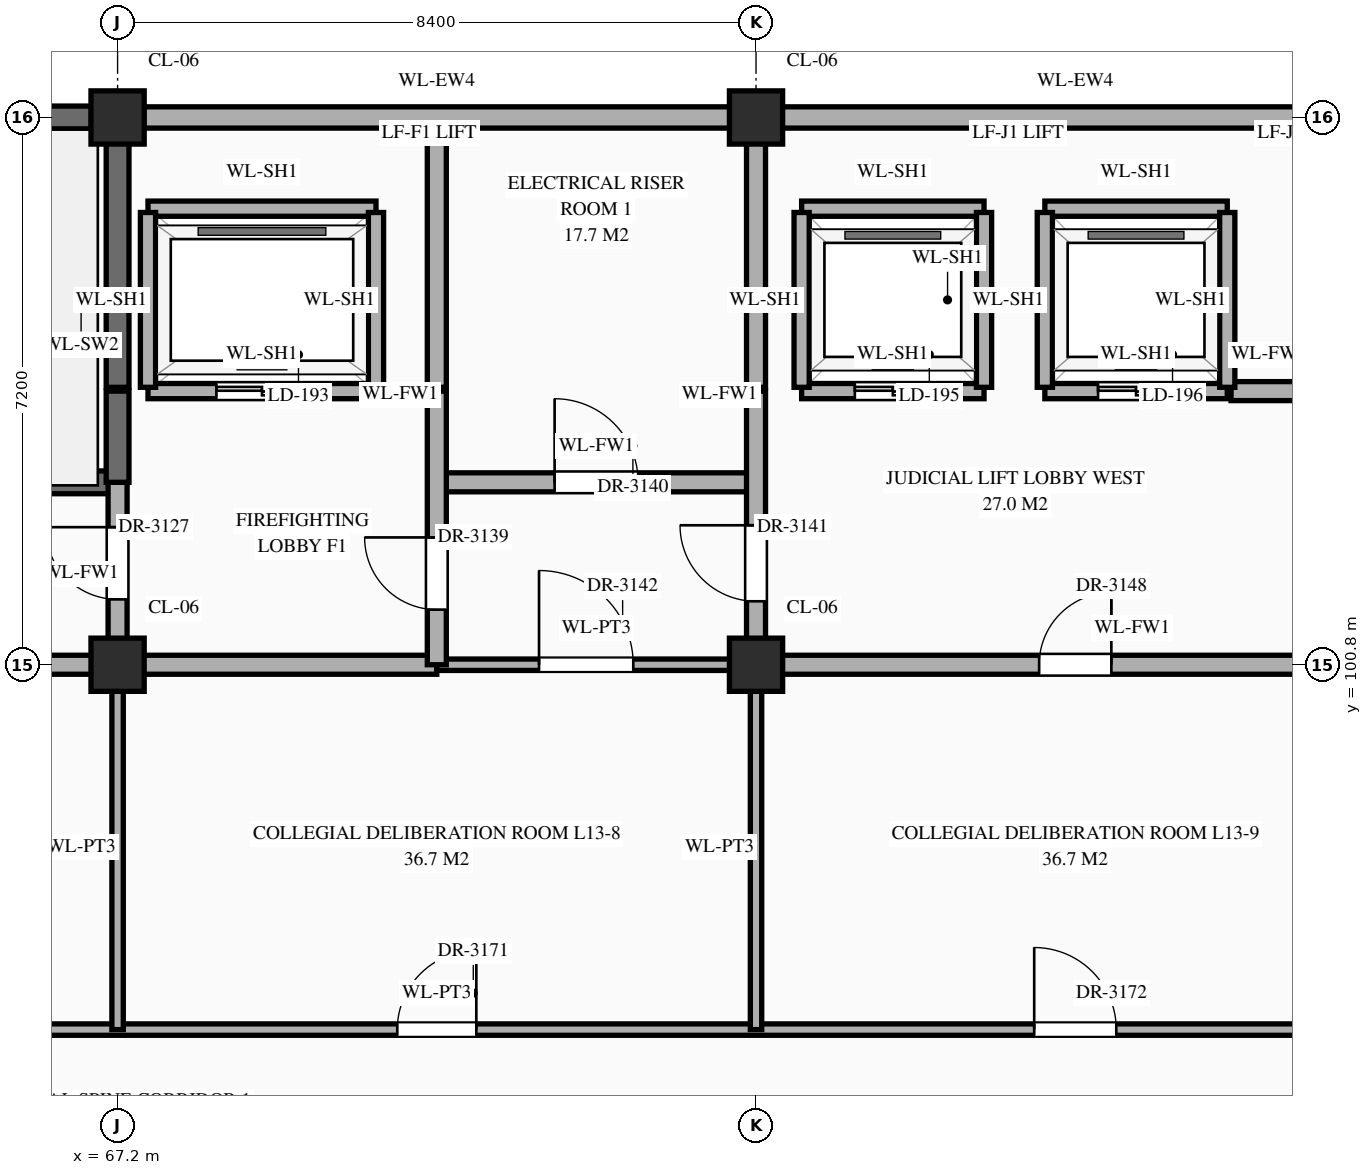
"""IFC4 building model, lengths in metres.
Left out: names, types, materials, properties, quantities, classifications, styles, units other than length and angle.
Written with IfcOpenShell. Run it as: python <this file> out.ifc"""

import sys

from ifc_helpers import new_model, si_unit, direction, frame, frame_2d, origin, origin_2d, place, context, subcontext, project, spatial, rectangle, extrude, element, fill, save


model = new_model("IFC4")
c1 = context("Model", 3, precision=1e-05, world=origin(), true_north=direction((0.0, 1.0)))
c2 = subcontext(c1, "Body", "Model", "MODEL_VIEW")
j1 = project(units=[si_unit("LENGTHUNIT", "METRE"), si_unit("PLANEANGLEUNIT", "RADIAN")], contexts=[c1])
p1 = place(None, origin())
s1 = spatial("IfcSite", under=j1, at=p1, CompositionType="ELEMENT")
p2 = place(p1, origin())
s2 = spatial("IfcBuilding", under=s1, at=p2, CompositionType="ELEMENT")
p3 = place(p2, frame((0.0, 0.0, 56.1)))
s3 = spatial("IfcBuildingStorey", under=s2, at=p3, CompositionType="ELEMENT", Elevation=56.1)
for number, where, z_axis, x_axis in (
    (1, (67.2, 100.8, 0.0), (0.0, 0.0, 1.0), (1.0, 0.0, 0.0)),
    (2, (67.2, 108.0, 0.0), (0.0, 0.0, 1.0), (1.0, 0.0, 0.0)),
    (3, (75.6, 100.8, 0.0), (0.0, 0.0, 1.0), (1.0, 0.0, 0.0)),
    (4, (75.6, 108.0, 0.0), (0.0, 0.0, 1.0), (1.0, 0.0, 0.0)),
):
    element("IfcColumn", number, at=place(p3, frame(where, z_axis=z_axis, x_axis=x_axis)), inside=s3, PredefinedType="COLUMN", context=c2, shape_type="SweptSolid", body=[
        extrude(rectangle(XDim=0.7, YDim=0.7, at=origin_2d()), origin(), (0.0, 0.0, 1.0), 4.2),
    ])
p4 = place(p3, frame((59.145, 108.0, 0.0), z_axis=(0.0, 0.0, 1.0), x_axis=(1.0, 0.0, 0.0)))
e5 = element("IfcWall", 5, at=p4, inside=s3, PredefinedType="SHEAR", context=c2, shape_type="SweptSolid", body=[
    extrude(rectangle(XDim=7.71, YDim=0.3, at=frame_2d((3.855, 0.0))), origin(), (0.0, 0.0, 1.0), 3.96),
])
for number, where, z_axis, x_axis in (
    (6, (67.545, 108.0, 0.0), (0.0, 0.0, 1.0), (1.0, 0.0, 0.0)),
    (7, (75.945, 108.0, 0.0), (0.0, 0.0, 1.0), (1.0, 0.0, 0.0)),
):
    element("IfcWall", number, at=place(p3, frame(where, z_axis=z_axis, x_axis=x_axis)), inside=s3, PredefinedType="STANDARD", context=c2, shape_type="SweptSolid", body=[
        extrude(rectangle(XDim=7.71, YDim=0.28, at=frame_2d((3.855, 0.0))), origin(), (0.0, 0.0, 1.0), 3.31),
    ])
p5 = place(p3, frame((58.8, 96.0, 0.0), z_axis=(0.0, 0.0, 1.0), x_axis=(1.0, 0.0, 0.0)))
e8 = element("IfcWall", 8, at=p5, inside=s3, PredefinedType="STANDARD", context=c2, shape_type="SweptSolid", body=[
    extrude(rectangle(XDim=25.2, YDim=0.15, at=frame_2d((12.6, 0.0))), origin(), (0.0, 0.0, 1.0), 3.96),
])
p6 = place(p5, frame((3.7, 0.0, 0.0)))
e9 = element("IfcOpeningElement", 9, at=p6, cuts=e8, PredefinedType="OPENING", context=c2, shape_type="SweptSolid", body=[
    extrude(rectangle(XDim=1.0, YDim=2.25, at=frame_2d((0.5, 1.125))), frame((0.0, 0.087, 0.0), z_axis=(0.0, -1.0, 0.0), x_axis=(1.0, 0.0, 0.0)), (0.0, 0.0, 1.0), 0.174),
])
p7 = place(p5, frame((12.08, 0.0, 0.0)))
e10 = element("IfcOpeningElement", 10, at=p7, cuts=e8, PredefinedType="OPENING", context=c2, shape_type="SweptSolid", body=[
    extrude(rectangle(XDim=1.04, YDim=2.2, at=frame_2d((0.52, 1.1))), frame((0.0, 0.087, 0.0), z_axis=(0.0, -1.0, 0.0), x_axis=(1.0, 0.0, 0.0)), (0.0, 0.0, 1.0), 0.174),
])
p8 = place(p5, frame((20.46, 0.0, 0.0)))
e11 = element("IfcOpeningElement", 11, at=p8, cuts=e8, PredefinedType="OPENING", context=c2, shape_type="SweptSolid", body=[
    extrude(rectangle(XDim=1.08, YDim=2.25, at=frame_2d((0.54, 1.125))), frame((0.0, 0.087, 0.0), z_axis=(0.0, -1.0, 0.0), x_axis=(1.0, 0.0, 0.0)), (0.0, 0.0, 1.0), 0.174),
])
p9 = place(p3, frame((58.8, 100.8, 0.0), z_axis=(0.0, 0.0, 1.0), x_axis=(1.0, 0.0, 0.0)))
e12 = element("IfcWall", 12, at=p9, inside=s3, PredefinedType="STANDARD", context=c2, shape_type="SweptSolid", body=[
    extrude(rectangle(XDim=12.6, YDim=0.25, at=frame_2d((6.3, 0.0))), origin(), (0.0, 0.0, 1.0), 3.11),
])
p10 = place(p9, frame((3.7, 0.0, 0.0)))
e13 = element("IfcOpeningElement", 13, at=p10, cuts=e12, PredefinedType="OPENING", context=c2, shape_type="SweptSolid", body=[
    extrude(rectangle(XDim=1.0, YDim=2.2, at=frame_2d((0.5, 1.1))), frame((0.0, 0.137, 0.0), z_axis=(0.0, -1.0, 0.0), x_axis=(1.0, 0.0, 0.0)), (0.0, 0.0, 1.0), 0.274),
])
p11 = place(p3, frame((71.4, 100.8, 0.0), z_axis=(0.0, 0.0, 1.0), x_axis=(1.0, 0.0, 0.0)))
e14 = element("IfcWall", 14, at=p11, inside=s3, PredefinedType="STANDARD", context=c2, shape_type="SweptSolid", body=[
    extrude(rectangle(XDim=4.2, YDim=0.15, at=frame_2d((2.1, 0.0))), origin(), (0.0, 0.0, 1.0), 3.11),
])
p12 = place(p11, frame((1.345, 0.0, 0.0)))
e15 = element("IfcOpeningElement", 15, at=p12, cuts=e14, PredefinedType="OPENING", context=c2, shape_type="SweptSolid", body=[
    extrude(rectangle(XDim=1.24, YDim=2.3, at=frame_2d((0.62, 1.15))), frame((0.0, 0.087, 0.0), z_axis=(0.0, -1.0, 0.0), x_axis=(1.0, 0.0, 0.0)), (0.0, 0.0, 1.0), 0.174),
])
p13 = place(p3, frame((75.6, 100.8, 0.0), z_axis=(0.0, 0.0, 1.0), x_axis=(1.0, 0.0, 0.0)))
e16 = element("IfcWall", 16, at=p13, inside=s3, PredefinedType="STANDARD", context=c2, shape_type="SweptSolid", body=[
    extrude(rectangle(XDim=16.8, YDim=0.25, at=frame_2d((8.4, 0.0))), origin(), (0.0, 0.0, 1.0), 3.11),
])
p14 = place(p13, frame((3.725, 0.0, 0.0)))
e17 = element("IfcOpeningElement", 17, at=p14, cuts=e16, PredefinedType="OPENING", context=c2, shape_type="SweptSolid", body=[
    extrude(rectangle(XDim=0.95, YDim=2.15, at=frame_2d((0.475, 1.075))), frame((0.0, 0.137, 0.0), z_axis=(0.0, -1.0, 0.0), x_axis=(1.0, 0.0, 0.0)), (0.0, 0.0, 1.0), 0.274),
])
p15 = place(p13, frame((9.685, 0.0, 0.0)))
e18 = element("IfcOpeningElement", 18, at=p15, cuts=e16, PredefinedType="OPENING", context=c2, shape_type="SweptSolid", body=[
    extrude(rectangle(XDim=1.1, YDim=2.2, at=frame_2d((0.55, 1.1))), frame((0.0, 0.137, 0.0), z_axis=(0.0, -1.0, 0.0), x_axis=(1.0, 0.0, 0.0)), (0.0, 0.0, 1.0), 0.274),
])
p16 = place(p13, frame((12.5, 0.0, 0.0)))
e19 = element("IfcOpeningElement", 19, at=p16, cuts=e16, PredefinedType="OPENING", context=c2, shape_type="SweptSolid", body=[
    extrude(rectangle(XDim=1.0, YDim=2.2, at=frame_2d((0.5, 1.1))), frame((0.0, 0.137, 0.0), z_axis=(0.0, -1.0, 0.0), x_axis=(1.0, 0.0, 0.0)), (0.0, 0.0, 1.0), 0.274),
])
p17 = place(p13, frame((14.89, 0.0, 0.0)))
e20 = element("IfcOpeningElement", 20, at=p17, cuts=e16, PredefinedType="OPENING", context=c2, shape_type="SweptSolid", body=[
    extrude(rectangle(XDim=0.95, YDim=2.15, at=frame_2d((0.475, 1.075))), frame((0.0, 0.137, 0.0), z_axis=(0.0, -1.0, 0.0), x_axis=(1.0, 0.0, 0.0)), (0.0, 0.0, 1.0), 0.274),
])
p18 = place(p3, frame((58.8, 103.2, 0.0), z_axis=(0.0, 0.0, 1.0), x_axis=(1.0, 0.0, 0.0)))
e21 = element("IfcWall", 21, at=p18, inside=s3, PredefinedType="SHEAR", context=c2, shape_type="SweptSolid", body=[
    extrude(rectangle(XDim=8.4, YDim=0.3, at=frame_2d((4.2, 0.0))), origin(), (0.0, 0.0, 1.0), 3.96),
])
p19 = place(p18, frame((0.65, 0.0, 0.0)))
e22 = element("IfcOpeningElement", 22, at=p19, cuts=e21, PredefinedType="OPENING", context=c2, shape_type="SweptSolid", body=[
    extrude(rectangle(XDim=1.1, YDim=2.2, at=frame_2d((0.55, 1.1))), frame((0.0, 0.162, 0.0), z_axis=(0.0, -1.0, 0.0), x_axis=(1.0, 0.0, 0.0)), (0.0, 0.0, 1.0), 0.324),
])
p20 = place(p3, frame((71.4, 103.2, 0.0), z_axis=(0.0, 0.0, 1.0), x_axis=(1.0, 0.0, 0.0)))
e23 = element("IfcWall", 23, at=p20, inside=s3, PredefinedType="STANDARD", context=c2, shape_type="SweptSolid", body=[
    extrude(rectangle(XDim=4.2, YDim=0.25, at=frame_2d((2.1, 0.0))), origin(), (0.0, 0.0, 1.0), 3.96),
])
p21 = place(p20, frame((1.55, 0.0, 0.0)))
e24 = element("IfcOpeningElement", 24, at=p21, cuts=e23, PredefinedType="OPENING", context=c2, shape_type="SweptSolid", body=[
    extrude(rectangle(XDim=1.1, YDim=2.2, at=frame_2d((0.55, 1.1))), frame((0.0, 0.137, 0.0), z_axis=(0.0, -1.0, 0.0), x_axis=(1.0, 0.0, 0.0)), (0.0, 0.0, 1.0), 0.274),
])
p22 = place(p3, frame((67.6, 104.4, 0.0), z_axis=(0.0, 0.0, 1.0), x_axis=(1.0, 0.0, 0.0)))
e25 = element("IfcWall", 25, at=p22, inside=s3, PredefinedType="STANDARD", context=c2, shape_type="SweptSolid", body=[
    extrude(rectangle(XDim=3.0, YDim=0.2, at=frame_2d((1.5, 0.0))), origin(), (0.0, 0.0, 1.0), 3.96),
])
p23 = place(p22, frame((0.9, 0.0, 0.0)))
e26 = element("IfcOpeningElement", 26, at=p23, cuts=e25, PredefinedType="OPENING", context=c2, shape_type="SweptSolid", body=[
    extrude(rectangle(XDim=1.2, YDim=2.15, at=frame_2d((0.6, 1.075))), frame((0.0, 0.112, 0.0), z_axis=(0.0, -1.0, 0.0), x_axis=(1.0, 0.0, 0.0)), (0.0, 0.0, 1.0), 0.224),
])
p24 = place(p3, frame((76.2, 104.4, 0.0), z_axis=(0.0, 0.0, 1.0), x_axis=(1.0, 0.0, 0.0)))
e27 = element("IfcWall", 27, at=p24, inside=s3, PredefinedType="STANDARD", context=c2, shape_type="SweptSolid", body=[
    extrude(rectangle(XDim=2.4, YDim=0.2, at=frame_2d((1.2, 0.0))), origin(), (0.0, 0.0, 1.0), 3.96),
])
p25 = place(p24, frame((0.7, 0.0, 0.0)))
e28 = element("IfcOpeningElement", 28, at=p25, cuts=e27, PredefinedType="OPENING", context=c2, shape_type="SweptSolid", body=[
    extrude(rectangle(XDim=1.0, YDim=2.15, at=frame_2d((0.5, 1.075))), frame((0.0, 0.112, 0.0), z_axis=(0.0, -1.0, 0.0), x_axis=(1.0, 0.0, 0.0)), (0.0, 0.0, 1.0), 0.224),
])
p26 = place(p3, frame((79.4, 104.4, 0.0), z_axis=(0.0, 0.0, 1.0), x_axis=(1.0, 0.0, 0.0)))
e29 = element("IfcWall", 29, at=p26, inside=s3, PredefinedType="STANDARD", context=c2, shape_type="SweptSolid", body=[
    extrude(rectangle(XDim=2.4, YDim=0.2, at=frame_2d((1.2, 0.0))), origin(), (0.0, 0.0, 1.0), 3.96),
])
p27 = place(p26, frame((0.7, 0.0, 0.0)))
e30 = element("IfcOpeningElement", 30, at=p27, cuts=e29, PredefinedType="OPENING", context=c2, shape_type="SweptSolid", body=[
    extrude(rectangle(XDim=1.0, YDim=2.15, at=frame_2d((0.5, 1.075))), frame((0.0, 0.112, 0.0), z_axis=(0.0, -1.0, 0.0), x_axis=(1.0, 0.0, 0.0)), (0.0, 0.0, 1.0), 0.224),
])
p28 = place(p3, frame((81.85, 104.4, 0.0), z_axis=(0.0, 0.0, 1.0), x_axis=(1.0, 0.0, 0.0)))
e31 = element("IfcWall", 31, at=p28, inside=s3, PredefinedType="STANDARD", context=c2, shape_type="SweptSolid", body=[
    extrude(rectangle(XDim=2.1, YDim=0.25, at=frame_2d((1.05, 0.0))), origin(), (0.0, 0.0, 1.0), 3.96),
])
p29 = place(p3, frame((67.6, 106.8, 0.0), z_axis=(0.0, 0.0, 1.0), x_axis=(1.0, 0.0, 0.0)))
e32 = element("IfcWall", 32, at=p29, inside=s3, PredefinedType="STANDARD", context=c2, shape_type="SweptSolid", body=[
    extrude(rectangle(XDim=3.0, YDim=0.2, at=frame_2d((1.5, 0.0))), origin(), (0.0, 0.0, 1.0), 3.96),
])
for number, where, z_axis, x_axis in (
    (33, (76.2, 106.8, 0.0), (0.0, 0.0, 1.0), (1.0, 0.0, 0.0)),
    (34, (79.4, 106.8, 0.0), (0.0, 0.0, 1.0), (1.0, 0.0, 0.0)),
):
    element("IfcWall", number, at=place(p3, frame(where, z_axis=z_axis, x_axis=x_axis)), inside=s3, PredefinedType="STANDARD", context=c2, shape_type="SweptSolid", body=[
        extrude(rectangle(XDim=2.4, YDim=0.2, at=frame_2d((1.2, 0.0))), origin(), (0.0, 0.0, 1.0), 3.96),
    ])
p30 = place(p3, frame((67.2, 96.0, 0.0), z_axis=(0.0, 0.0, 1.0), x_axis=(0.0, 1.0, 0.0)))
e35 = element("IfcWall", 35, at=p30, inside=s3, PredefinedType="STANDARD", context=c2, shape_type="SweptSolid", body=[
    extrude(rectangle(XDim=4.8, YDim=0.15, at=frame_2d((2.4, 0.0))), origin(), (0.0, 0.0, 1.0), 3.21),
])
p31 = place(p3, frame((67.2, 100.8, 0.0), z_axis=(0.0, 0.0, 1.0), x_axis=(0.0, 1.0, 0.0)))
e36 = element("IfcWall", 36, at=p31, inside=s3, PredefinedType="STANDARD", context=c2, shape_type="SweptSolid", body=[
    extrude(rectangle(XDim=2.4, YDim=0.25, at=frame_2d((1.2, 0.0))), origin(), (0.0, 0.0, 1.0), 3.21),
])
p32 = place(p31, frame((0.86, 0.0, 0.0)))
e37 = element("IfcOpeningElement", 37, at=p32, cuts=e36, PredefinedType="OPENING", context=c2, shape_type="SweptSolid", body=[
    extrude(rectangle(XDim=0.95, YDim=2.15, at=frame_2d((0.475, 1.075))), frame((0.0, 0.137, 0.0), z_axis=(0.0, -1.0, 0.0), x_axis=(1.0, 0.0, 0.0)), (0.0, 0.0, 1.0), 0.274),
])
p33 = place(p3, frame((67.2, 103.2, 0.0), z_axis=(0.0, 0.0, 1.0), x_axis=(0.0, 1.0, 0.0)))
e38 = element("IfcWall", 38, at=p33, inside=s3, PredefinedType="SHEAR", context=c2, shape_type="SweptSolid", body=[
    extrude(rectangle(XDim=1.2, YDim=0.3, at=frame_2d((0.6, 0.0))), origin(), (0.0, 0.0, 1.0), 3.96),
])
p34 = place(p3, frame((67.2, 104.45, 0.0), z_axis=(0.0, 0.0, 1.0), x_axis=(0.0, 1.0, 0.0)))
e39 = element("IfcWall", 39, at=p34, inside=s3, PredefinedType="SHEAR", context=c2, shape_type="SweptSolid", body=[
    extrude(rectangle(XDim=3.46, YDim=0.3, at=frame_2d((1.73, 0.0))), origin(), (0.0, 0.0, 1.0), 3.96),
])
for number, where, z_axis, x_axis in (
    (40, (67.6, 104.45, 0.0), (0.0, 0.0, 1.0), (0.0, 1.0, 0.0)),
    (41, (70.6, 104.45, 0.0), (0.0, 0.0, 1.0), (0.0, 1.0, 0.0)),
):
    element("IfcWall", number, at=place(p3, frame(where, z_axis=z_axis, x_axis=x_axis)), inside=s3, PredefinedType="STANDARD", context=c2, shape_type="SweptSolid", body=[
        extrude(rectangle(XDim=2.3, YDim=0.2, at=frame_2d((1.15, 0.0))), origin(), (0.0, 0.0, 1.0), 3.96),
    ])
p35 = place(p3, frame((71.4, 100.8, 0.0), z_axis=(0.0, 0.0, 1.0), x_axis=(0.0, 1.0, 0.0)))
e42 = element("IfcWall", 42, at=p35, inside=s3, PredefinedType="STANDARD", context=c2, shape_type="SweptSolid", body=[
    extrude(rectangle(XDim=3.6, YDim=0.25, at=frame_2d((1.8, 0.0))), origin(), (0.0, 0.0, 1.0), 3.61),
])
p36 = place(p35, frame((0.725, 0.0, 0.0)))
e43 = element("IfcOpeningElement", 43, at=p36, cuts=e42, PredefinedType="OPENING", context=c2, shape_type="SweptSolid", body=[
    extrude(rectangle(XDim=0.95, YDim=2.15, at=frame_2d((0.475, 1.075))), frame((0.0, 0.137, 0.0), z_axis=(0.0, -1.0, 0.0), x_axis=(1.0, 0.0, 0.0)), (0.0, 0.0, 1.0), 0.274),
])
p37 = place(p3, frame((71.4, 104.45, 0.0), z_axis=(0.0, 0.0, 1.0), x_axis=(0.0, 1.0, 0.0)))
e44 = element("IfcWall", 44, at=p37, inside=s3, PredefinedType="STANDARD", context=c2, shape_type="SweptSolid", body=[
    extrude(rectangle(XDim=3.46, YDim=0.25, at=frame_2d((1.73, 0.0))), origin(), (0.0, 0.0, 1.0), 3.61),
])
p38 = place(p3, frame((75.6, 96.0, 0.0), z_axis=(0.0, 0.0, 1.0), x_axis=(0.0, 1.0, 0.0)))
e45 = element("IfcWall", 45, at=p38, inside=s3, PredefinedType="STANDARD", context=c2, shape_type="SweptSolid", body=[
    extrude(rectangle(XDim=4.8, YDim=0.15, at=frame_2d((2.4, 0.0))), origin(), (0.0, 0.0, 1.0), 3.21),
])
p39 = place(p3, frame((75.6, 100.8, 0.0), z_axis=(0.0, 0.0, 1.0), x_axis=(0.0, 1.0, 0.0)))
e46 = element("IfcWall", 46, at=p39, inside=s3, PredefinedType="STANDARD", context=c2, shape_type="SweptSolid", body=[
    extrude(rectangle(XDim=3.6, YDim=0.25, at=frame_2d((1.8, 0.0))), origin(), (0.0, 0.0, 1.0), 3.21),
])
p40 = place(p39, frame((0.835, 0.0, 0.0)))
e47 = element("IfcOpeningElement", 47, at=p40, cuts=e46, PredefinedType="OPENING", context=c2, shape_type="SweptSolid", body=[
    extrude(rectangle(XDim=1.0, YDim=2.2, at=frame_2d((0.5, 1.1))), frame((0.0, 0.137, 0.0), z_axis=(0.0, -1.0, 0.0), x_axis=(1.0, 0.0, 0.0)), (0.0, 0.0, 1.0), 0.274),
])
p41 = place(p3, frame((75.6, 104.45, 0.0), z_axis=(0.0, 0.0, 1.0), x_axis=(0.0, 1.0, 0.0)))
e48 = element("IfcWall", 48, at=p41, inside=s3, PredefinedType="STANDARD", context=c2, shape_type="SweptSolid", body=[
    extrude(rectangle(XDim=3.46, YDim=0.25, at=frame_2d((1.73, 0.0))), origin(), (0.0, 0.0, 1.0), 3.21),
])
for number, where, z_axis, x_axis in (
    (49, (76.2, 104.45, 0.0), (0.0, 0.0, 1.0), (0.0, 1.0, 0.0)),
    (50, (78.6, 104.45, 0.0), (0.0, 0.0, 1.0), (0.0, 1.0, 0.0)),
    (51, (79.4, 104.45, 0.0), (0.0, 0.0, 1.0), (0.0, 1.0, 0.0)),
    (52, (81.8, 104.45, 0.0), (0.0, 0.0, 1.0), (0.0, 1.0, 0.0)),
):
    element("IfcWall", number, at=place(p3, frame(where, z_axis=z_axis, x_axis=x_axis)), inside=s3, PredefinedType="STANDARD", context=c2, shape_type="SweptSolid", body=[
        extrude(rectangle(XDim=2.3, YDim=0.2, at=frame_2d((1.15, 0.0))), origin(), (0.0, 0.0, 1.0), 3.96),
    ])
p42 = place(p23, origin())
e53 = element("IfcDoor", 53, at=p42, inside=s3, OperationType="DOUBLE_DOOR_SLIDING", PredefinedType="DOOR", context=c2, shape_type="SweptSolid", body=[
    extrude(rectangle(XDim=1.2, YDim=2.15, at=frame_2d((0.6, 1.075))), frame((0.0, 0.025, 0.0), z_axis=(0.0, -1.0, 0.0), x_axis=(1.0, 0.0, 0.0)), (0.0, 0.0, 1.0), 0.05),
])
fill(e26, e53)
p43 = place(p25, origin())
e54 = element("IfcDoor", 54, at=p43, inside=s3, OperationType="DOUBLE_DOOR_SLIDING", PredefinedType="DOOR", context=c2, shape_type="SweptSolid", body=[
    extrude(rectangle(XDim=1.0, YDim=2.15, at=frame_2d((0.5, 1.075))), frame((0.0, 0.025, 0.0), z_axis=(0.0, -1.0, 0.0), x_axis=(1.0, 0.0, 0.0)), (0.0, 0.0, 1.0), 0.05),
])
fill(e28, e54)
p44 = place(p27, origin())
e55 = element("IfcDoor", 55, at=p44, inside=s3, OperationType="DOUBLE_DOOR_SLIDING", PredefinedType="DOOR", context=c2, shape_type="SweptSolid", body=[
    extrude(rectangle(XDim=1.0, YDim=2.15, at=frame_2d((0.5, 1.075))), frame((0.0, 0.025, 0.0), z_axis=(0.0, -1.0, 0.0), x_axis=(1.0, 0.0, 0.0)), (0.0, 0.0, 1.0), 0.05),
])
fill(e30, e55)
p45 = place(p32, origin())
e56 = element("IfcDoor", 56, at=p45, inside=s3, OperationType="SINGLE_SWING_RIGHT", PredefinedType="DOOR", context=c2, shape_type="SweptSolid", body=[
    extrude(rectangle(XDim=0.95, YDim=2.15, at=frame_2d((0.475, 1.075))), frame((0.0, 0.025, 0.0), z_axis=(0.0, -1.0, 0.0), x_axis=(1.0, 0.0, 0.0)), (0.0, 0.0, 1.0), 0.05),
])
fill(e37, e56)
p46 = place(p36, origin())
e57 = element("IfcDoor", 57, at=p46, inside=s3, OperationType="SINGLE_SWING_RIGHT", PredefinedType="DOOR", context=c2, shape_type="SweptSolid", body=[
    extrude(rectangle(XDim=0.95, YDim=2.15, at=frame_2d((0.475, 1.075))), frame((0.0, 0.025, 0.0), z_axis=(0.0, -1.0, 0.0), x_axis=(1.0, 0.0, 0.0)), (0.0, 0.0, 1.0), 0.05),
])
fill(e43, e57)
p47 = place(p21, origin())
e58 = element("IfcDoor", 58, at=p47, inside=s3, OperationType="SINGLE_SWING_LEFT", PredefinedType="DOOR", context=c2, shape_type="SweptSolid", body=[
    extrude(rectangle(XDim=1.1, YDim=2.2, at=frame_2d((0.55, 1.1))), frame((0.0, 0.025, 0.0), z_axis=(0.0, -1.0, 0.0), x_axis=(1.0, 0.0, 0.0)), (0.0, 0.0, 1.0), 0.05),
])
fill(e24, e58)
p48 = place(p40, origin())
e59 = element("IfcDoor", 59, at=p48, inside=s3, OperationType="SINGLE_SWING_RIGHT", PredefinedType="DOOR", context=c2, shape_type="SweptSolid", body=[
    extrude(rectangle(XDim=1.0, YDim=2.2, at=frame_2d((0.5, 1.1))), frame((0.0, 0.025, 0.0), z_axis=(0.0, -1.0, 0.0), x_axis=(1.0, 0.0, 0.0)), (0.0, 0.0, 1.0), 0.05),
])
fill(e47, e59)
p49 = place(p12, origin())
e60 = element("IfcDoor", 60, at=p49, inside=s3, OperationType="SINGLE_SWING_LEFT", PredefinedType="DOOR", context=c2, shape_type="SweptSolid", body=[
    extrude(rectangle(XDim=1.24, YDim=2.3, at=frame_2d((0.62, 1.15))), frame((0.0, 0.025, 0.0), z_axis=(0.0, -1.0, 0.0), x_axis=(1.0, 0.0, 0.0)), (0.0, 0.0, 1.0), 0.05),
])
fill(e15, e60)
p50 = place(p14, origin())
e61 = element("IfcDoor", 61, at=p50, inside=s3, OperationType="SINGLE_SWING_RIGHT", PredefinedType="DOOR", context=c2, shape_type="SweptSolid", body=[
    extrude(rectangle(XDim=0.95, YDim=2.15, at=frame_2d((0.475, 1.075))), frame((0.0, 0.025, 0.0), z_axis=(0.0, -1.0, 0.0), x_axis=(1.0, 0.0, 0.0)), (0.0, 0.0, 1.0), 0.05),
])
fill(e17, e61)
p51 = place(p7, origin())
e62 = element("IfcDoor", 62, at=p51, inside=s3, OperationType="SINGLE_SWING_RIGHT", PredefinedType="DOOR", context=c2, shape_type="SweptSolid", body=[
    extrude(rectangle(XDim=1.04, YDim=2.2, at=frame_2d((0.52, 1.1))), frame((0.0, 0.025, 0.0), z_axis=(0.0, -1.0, 0.0), x_axis=(1.0, 0.0, 0.0)), (0.0, 0.0, 1.0), 0.05),
])
fill(e10, e62)
p52 = place(p8, origin())
e63 = element("IfcDoor", 63, at=p52, inside=s3, OperationType="SINGLE_SWING_LEFT", PredefinedType="DOOR", context=c2, shape_type="SweptSolid", body=[
    extrude(rectangle(XDim=1.08, YDim=2.25, at=frame_2d((0.54, 1.125))), frame((0.0, 0.025, 0.0), z_axis=(0.0, -1.0, 0.0), x_axis=(1.0, 0.0, 0.0)), (0.0, 0.0, 1.0), 0.05),
])
fill(e11, e63)
save(model, sys.argv[1])
